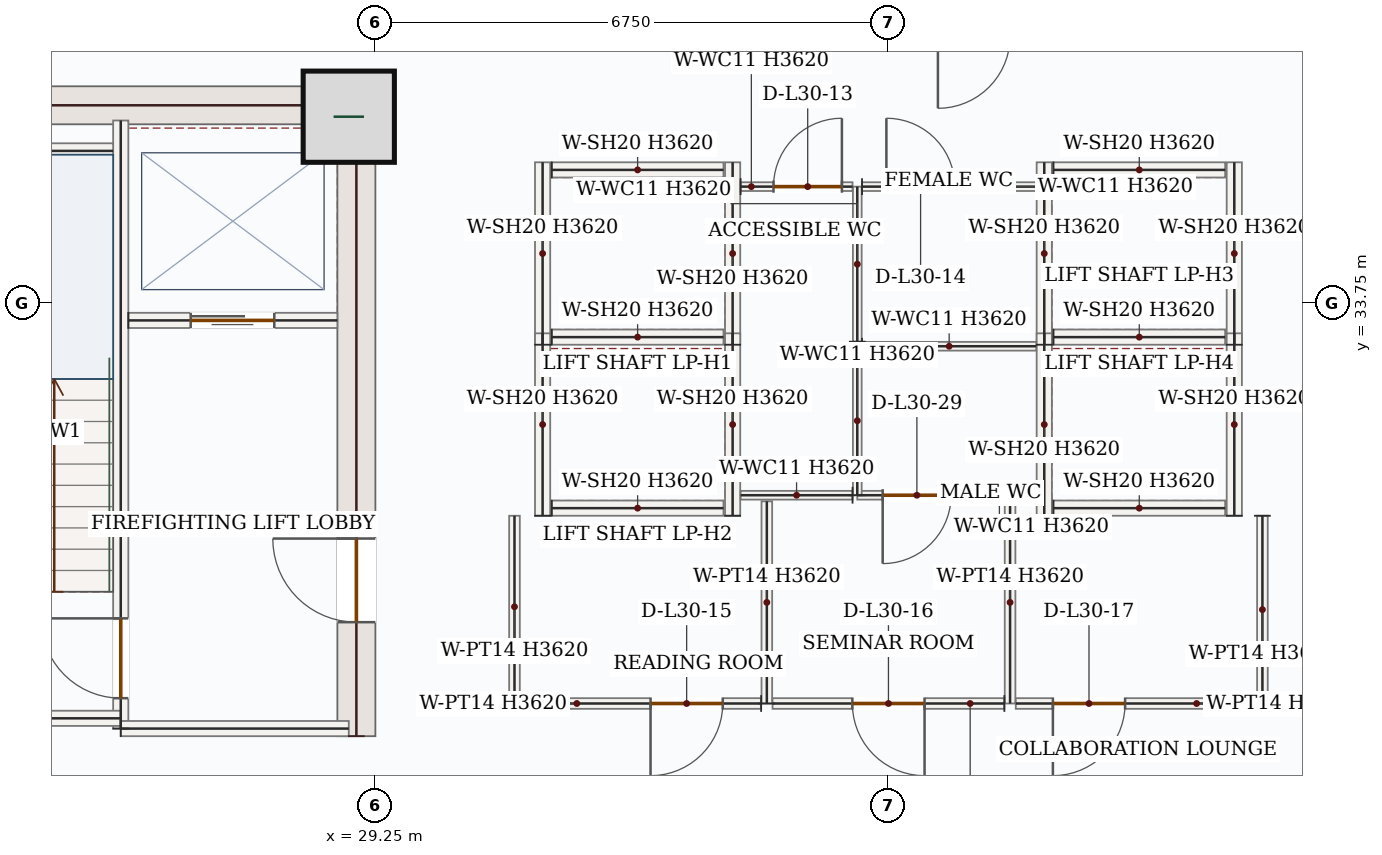
"""IFC4 building model, lengths in metres.
Left out: names, types, materials, properties, quantities, classifications, styles, units other than length and angle.
Written with IfcOpenShell. Run it as: python <this file> out.ifc"""

import sys

from ifc_helpers import new_model, si_unit, direction, frame, frame_2d, origin, origin_2d, place, context, subcontext, project, spatial, rectangle, extrude, source, transform, mapped, element, fill, save


model = new_model("IFC4")
c1 = context("Model", 3, precision=1e-05, world=origin(), true_north=direction((0.0, 1.0)))
c2 = subcontext(c1, "Body", "Model", "MODEL_VIEW")
j1 = project(units=[si_unit("LENGTHUNIT", "METRE"), si_unit("PLANEANGLEUNIT", "RADIAN")], contexts=[c1])
p1 = place(None, origin())
s1 = spatial("IfcSite", under=j1, at=p1, CompositionType="ELEMENT")
p2 = place(p1, origin())
s2 = spatial("IfcBuilding", under=s1, at=p2, CompositionType="ELEMENT")
p3 = place(p2, frame((0.0, 0.0, 135.6)))
s3 = spatial("IfcBuildingStorey", under=s2, at=p3, CompositionType="ELEMENT", Elevation=135.6)
p4 = place(p3, frame((29.0, 28.05, 0.0), z_axis=(0.0, 0.0, 1.0), x_axis=(0.0, 1.0, 0.0)))
e1 = element("IfcWall", 1, at=p4, inside=s3, PredefinedType="SHEAR", context=c2, shape_type="SweptSolid", body=[
    extrude(rectangle(XDim=8.55, YDim=0.5, at=frame_2d((4.275, 0.0))), origin(), (0.0, 0.0, 1.0), 3.62),
])
p5 = place(p4, frame((1.5, 0.0, 0.0)))
e2 = element("IfcOpeningElement", 2, at=p5, cuts=e1, PredefinedType="OPENING", context=c2, shape_type="SweptSolid", body=[
    extrude(rectangle(XDim=1.1, YDim=2.2, at=frame_2d((0.55, 1.1))), frame((0.0, 0.26, 0.0), z_axis=(0.0, -1.0, 0.0), x_axis=(1.0, 0.0, 0.0)), (0.0, 0.0, 1.0), 0.52),
])
m1 = source(origin(), c2, "Body", "SweptSolid", [
    extrude(rectangle(XDim=7.0, YDim=0.5, at=frame_2d((3.5, 0.0))), origin(), (0.0, 0.0, 1.0), 3.62),
])
p6 = place(p3, frame((21.75, 36.35, 0.0), z_axis=(0.0, 0.0, 1.0), x_axis=(1.0, 0.0, 0.0)))
e3 = element("IfcWall", 3, at=p6, inside=s3, PredefinedType="SHEAR", context=c2, shape_type="MappedRepresentation", body=[
    mapped(m1, transform((0.0, 0.0, 0.0), x_axis=(1.0, 0.0, 0.0), y_axis=(0.0, 1.0, 0.0), z_axis=(0.0, 0.0, 1.0), scale=1.0)),
])
m2 = source(origin(), c2, "Body", "SweptSolid", [
    extrude(rectangle(XDim=1.2, YDim=1.2, at=origin_2d()), origin(), (0.0, 0.0, 1.0), 3.9),
])
p7 = place(p3, frame((28.9, 36.2, 0.0), z_axis=(0.0, 0.0, 1.0), x_axis=(1.0, 0.0, 0.0)))
e4 = element("IfcColumn", 4, at=p7, inside=s3, PredefinedType="COLUMN", context=c2, shape_type="MappedRepresentation", body=[
    mapped(m2, transform((0.0, 0.0, 0.0), x_axis=(1.0, 0.0, 0.0), y_axis=(0.0, 1.0, 0.0), z_axis=(0.0, 0.0, 1.0), scale=1.0)),
])
p8 = place(p3, frame((25.9, 28.15, 0.0), z_axis=(0.0, 0.0, 1.0), x_axis=(0.0, 1.0, 0.0)))
e5 = element("IfcWall", 5, at=p8, inside=s3, PredefinedType="SOLIDWALL", context=c2, shape_type="SweptSolid", body=[
    extrude(rectangle(XDim=8.0, YDim=0.2, at=frame_2d((4.0, 0.0))), origin(), (0.0, 0.0, 1.0), 3.62),
])
p9 = place(p8, frame((0.4, 0.0, 0.0)))
e6 = element("IfcOpeningElement", 6, at=p9, cuts=e5, PredefinedType="OPENING", context=c2, shape_type="SweptSolid", body=[
    extrude(rectangle(XDim=1.05, YDim=2.15, at=frame_2d((0.525, 1.075))), frame((0.0, 0.11, 0.0), z_axis=(0.0, -1.0, 0.0), x_axis=(1.0, 0.0, 0.0)), (0.0, 0.0, 1.0), 0.22),
])
m3 = source(origin(), c2, "Body", "SweptSolid", [
    extrude(rectangle(XDim=4.25, YDim=0.2, at=frame_2d((2.125, 0.0))), origin(), (0.0, 0.0, 1.0), 3.62),
])
p10 = place(p3, frame((21.65, 28.285, 0.0), z_axis=(0.0, 0.0, 1.0), x_axis=(1.0, 0.0, 0.0)))
e7 = element("IfcWall", 7, at=p10, inside=s3, PredefinedType="SOLIDWALL", context=c2, shape_type="MappedRepresentation", body=[
    mapped(m3, transform((0.0, 0.0, 0.0), x_axis=(1.0, 0.0, 0.0), y_axis=(0.0, 1.0, 0.0), z_axis=(0.0, 0.0, 1.0), scale=1.0)),
])
m4 = source(origin(), c2, "Body", "SweptSolid", [
    extrude(rectangle(XDim=3.0, YDim=0.2, at=frame_2d((1.5, 0.0))), origin(), (0.0, 0.0, 1.0), 3.62),
])
p11 = place(p3, frame((25.9, 28.15, 0.0), z_axis=(0.0, 0.0, 1.0), x_axis=(1.0, 0.0, 0.0)))
e8 = element("IfcWall", 8, at=p11, inside=s3, PredefinedType="SOLIDWALL", context=c2, shape_type="MappedRepresentation", body=[
    mapped(m4, transform((0.0, 0.0, 0.0), x_axis=(1.0, 0.0, 0.0), y_axis=(0.0, 1.0, 0.0), z_axis=(0.0, 0.0, 1.0), scale=1.0)),
])
m5 = source(origin(), c2, "Body", "SweptSolid", [
    extrude(rectangle(XDim=3.25, YDim=0.2, at=frame_2d((1.625, 0.0))), origin(), (0.0, 0.0, 1.0), 3.62),
])
p12 = place(p3, frame((22.55, 35.75, 0.0), z_axis=(0.0, 0.0, 1.0), x_axis=(1.0, 0.0, 0.0)))
e9 = element("IfcWall", 9, at=p12, inside=s3, PredefinedType="SOLIDWALL", context=c2, shape_type="MappedRepresentation", body=[
    mapped(m5, transform((0.0, 0.0, 0.0), x_axis=(1.0, 0.0, 0.0), y_axis=(0.0, 1.0, 0.0), z_axis=(0.0, 0.0, 1.0), scale=1.0)),
])
p13 = place(p3, frame((26.0, 33.52, 0.0), z_axis=(0.0, 0.0, 1.0), x_axis=(1.0, 0.0, 0.0)))
e10 = element("IfcWall", 10, at=p13, inside=s3, PredefinedType="SOLIDWALL", context=c2, shape_type="SweptSolid", body=[
    extrude(rectangle(XDim=2.75, YDim=0.2, at=frame_2d((1.375, 0.0))), origin(), (0.0, 0.0, 1.0), 3.62),
])
p14 = place(p13, frame((0.82, 0.0, 0.0)))
e11 = element("IfcOpeningElement", 11, at=p14, cuts=e10, PredefinedType="OPENING", context=c2, shape_type="SweptSolid", body=[
    extrude(rectangle(XDim=1.1, YDim=2.15, at=frame_2d((0.55, 1.075))), frame((0.0, 0.11, 0.0), z_axis=(0.0, -1.0, 0.0), x_axis=(1.0, 0.0, 0.0)), (0.0, 0.0, 1.0), 0.22),
])
m6 = source(origin(), c2, "Body", "SweptSolid", [
    extrude(rectangle(XDim=2.4, YDim=0.2, at=frame_2d((1.2, 0.0))), origin(), (0.0, 0.0, 1.0), 3.62),
])
for number, where, z_axis, x_axis in (
    (12, (31.45, 33.2, 0.0), (0.0, 0.0, 1.0), (0.0, 1.0, 0.0)),
    (13, (33.95, 33.2, 0.0), (0.0, 0.0, 1.0), (0.0, 1.0, 0.0)),
):
    element("IfcWall", number, at=place(p3, frame(where, z_axis=z_axis, x_axis=x_axis)), inside=s3, PredefinedType="SOLIDWALL", context=c2, shape_type="MappedRepresentation", body=[
        mapped(m6, transform((0.0, 0.0, 0.0), x_axis=(1.0, 0.0, 0.0), y_axis=(0.0, 1.0, 0.0), z_axis=(0.0, 0.0, 1.0), scale=1.0)),
    ])
m7 = source(origin(), c2, "Body", "SweptSolid", [
    extrude(rectangle(XDim=2.26, YDim=0.2, at=frame_2d((1.13, 0.0))), origin(), (0.0, 0.0, 1.0), 3.62),
])
for number, where, z_axis, x_axis in (
    (14, (31.57, 33.3, 0.0), (0.0, 0.0, 1.0), (1.0, 0.0, 0.0)),
    (15, (31.57, 35.5, 0.0), (0.0, 0.0, 1.0), (1.0, 0.0, 0.0)),
):
    element("IfcWall", number, at=place(p3, frame(where, z_axis=z_axis, x_axis=x_axis)), inside=s3, PredefinedType="SOLIDWALL", context=c2, shape_type="MappedRepresentation", body=[
        mapped(m7, transform((0.0, 0.0, 0.0), x_axis=(1.0, 0.0, 0.0), y_axis=(0.0, 1.0, 0.0), z_axis=(0.0, 0.0, 1.0), scale=1.0)),
    ])
for number, where, z_axis, x_axis in (
    (16, (31.45, 30.95, 0.0), (0.0, 0.0, 1.0), (0.0, 1.0, 0.0)),
    (17, (33.95, 30.95, 0.0), (0.0, 0.0, 1.0), (0.0, 1.0, 0.0)),
):
    element("IfcWall", number, at=place(p3, frame(where, z_axis=z_axis, x_axis=x_axis)), inside=s3, PredefinedType="SOLIDWALL", context=c2, shape_type="MappedRepresentation", body=[
        mapped(m6, transform((0.0, 0.0, 0.0), x_axis=(1.0, 0.0, 0.0), y_axis=(0.0, 1.0, 0.0), z_axis=(0.0, 0.0, 1.0), scale=1.0)),
    ])
p15 = place(p3, frame((31.57, 31.05, 0.0), z_axis=(0.0, 0.0, 1.0), x_axis=(1.0, 0.0, 0.0)))
e18 = element("IfcWall", 18, at=p15, inside=s3, PredefinedType="SOLIDWALL", context=c2, shape_type="MappedRepresentation", body=[
    mapped(m7, transform((0.0, 0.0, 0.0), x_axis=(1.0, 0.0, 0.0), y_axis=(0.0, 1.0, 0.0), z_axis=(0.0, 0.0, 1.0), scale=1.0)),
])
for number, where, z_axis, x_axis in (
    (19, (38.05, 33.2, 0.0), (0.0, 0.0, 1.0), (0.0, 1.0, 0.0)),
    (20, (40.55, 33.2, 0.0), (0.0, 0.0, 1.0), (0.0, 1.0, 0.0)),
):
    element("IfcWall", number, at=place(p3, frame(where, z_axis=z_axis, x_axis=x_axis)), inside=s3, PredefinedType="SOLIDWALL", context=c2, shape_type="MappedRepresentation", body=[
        mapped(m6, transform((0.0, 0.0, 0.0), x_axis=(1.0, 0.0, 0.0), y_axis=(0.0, 1.0, 0.0), z_axis=(0.0, 0.0, 1.0), scale=1.0)),
    ])
for number, where, z_axis, x_axis in (
    (21, (38.17, 33.3, 0.0), (0.0, 0.0, 1.0), (1.0, 0.0, 0.0)),
    (22, (38.17, 35.5, 0.0), (0.0, 0.0, 1.0), (1.0, 0.0, 0.0)),
):
    element("IfcWall", number, at=place(p3, frame(where, z_axis=z_axis, x_axis=x_axis)), inside=s3, PredefinedType="SOLIDWALL", context=c2, shape_type="MappedRepresentation", body=[
        mapped(m7, transform((0.0, 0.0, 0.0), x_axis=(1.0, 0.0, 0.0), y_axis=(0.0, 1.0, 0.0), z_axis=(0.0, 0.0, 1.0), scale=1.0)),
    ])
for number, where, z_axis, x_axis in (
    (23, (38.05, 30.95, 0.0), (0.0, 0.0, 1.0), (0.0, 1.0, 0.0)),
    (24, (40.55, 30.95, 0.0), (0.0, 0.0, 1.0), (0.0, 1.0, 0.0)),
):
    element("IfcWall", number, at=place(p3, frame(where, z_axis=z_axis, x_axis=x_axis)), inside=s3, PredefinedType="SOLIDWALL", context=c2, shape_type="MappedRepresentation", body=[
        mapped(m6, transform((0.0, 0.0, 0.0), x_axis=(1.0, 0.0, 0.0), y_axis=(0.0, 1.0, 0.0), z_axis=(0.0, 0.0, 1.0), scale=1.0)),
    ])
p16 = place(p3, frame((38.17, 31.05, 0.0), z_axis=(0.0, 0.0, 1.0), x_axis=(1.0, 0.0, 0.0)))
e25 = element("IfcWall", 25, at=p16, inside=s3, PredefinedType="SOLIDWALL", context=c2, shape_type="MappedRepresentation", body=[
    mapped(m7, transform((0.0, 0.0, 0.0), x_axis=(1.0, 0.0, 0.0), y_axis=(0.0, 1.0, 0.0), z_axis=(0.0, 0.0, 1.0), scale=1.0)),
])
p17 = place(p3, frame((37.945, 31.22, 0.0), z_axis=(0.0, 0.0, 1.0), x_axis=(-1.0, 0.0, 0.0)))
e26 = element("IfcWall", 26, at=p17, inside=s3, PredefinedType="PARTITIONING", context=c2, shape_type="SweptSolid", body=[
    extrude(rectangle(XDim=2.355, YDim=0.115, at=frame_2d((1.177, 0.0))), origin(), (0.0, 0.0, 1.0), 3.62),
])
p18 = place(p17, frame((1.121, 0.0, 0.0)))
e27 = element("IfcOpeningElement", 27, at=p18, cuts=e26, PredefinedType="OPENING", context=c2, shape_type="SweptSolid", body=[
    extrude(rectangle(XDim=0.9, YDim=2.1, at=frame_2d((0.45, 1.05))), frame((0.0, 0.067, 0.0), z_axis=(0.0, -1.0, 0.0), x_axis=(1.0, 0.0, 0.0)), (0.0, 0.0, 1.0), 0.135),
])
m8 = source(origin(), c2, "Body", "SweptSolid", [
    extrude(rectangle(XDim=1.96, YDim=0.115, at=frame_2d((0.98, 0.0))), origin(), (0.0, 0.0, 1.0), 3.62),
])
p19 = place(p3, frame((35.59, 31.22, 0.0), z_axis=(0.0, 0.0, 1.0), x_axis=(0.0, 1.0, 0.0)))
e28 = element("IfcWall", 28, at=p19, inside=s3, PredefinedType="PARTITIONING", context=c2, shape_type="MappedRepresentation", body=[
    mapped(m8, transform((0.0, 0.0, 0.0), x_axis=(1.0, 0.0, 0.0), y_axis=(0.0, 1.0, 0.0), z_axis=(0.0, 0.0, 1.0), scale=1.0)),
])
m9 = source(origin(), c2, "Body", "SweptSolid", [
    extrude(rectangle(XDim=2.292, YDim=0.115, at=frame_2d((1.146, 0.0))), origin(), (0.0, 0.0, 1.0), 3.62),
])
p20 = place(p3, frame((35.653, 33.18, 0.0), z_axis=(0.0, 0.0, 1.0), x_axis=(1.0, 0.0, 0.0)))
e29 = element("IfcWall", 29, at=p20, inside=s3, PredefinedType="PARTITIONING", context=c2, shape_type="MappedRepresentation", body=[
    mapped(m9, transform((0.0, 0.0, 0.0), x_axis=(1.0, 0.0, 0.0), y_axis=(0.0, 1.0, 0.0), z_axis=(0.0, 0.0, 1.0), scale=1.0)),
])
m10 = source(origin(), c2, "Body", "SweptSolid", [
    extrude(rectangle(XDim=2.04, YDim=0.115, at=frame_2d((1.02, 0.0))), origin(), (0.0, 0.0, 1.0), 3.62),
])
p21 = place(p3, frame((35.59, 33.24, 0.0), z_axis=(0.0, 0.0, 1.0), x_axis=(0.0, 1.0, 0.0)))
e30 = element("IfcWall", 30, at=p21, inside=s3, PredefinedType="PARTITIONING", context=c2, shape_type="MappedRepresentation", body=[
    mapped(m10, transform((0.0, 0.0, 0.0), x_axis=(1.0, 0.0, 0.0), y_axis=(0.0, 1.0, 0.0), z_axis=(0.0, 0.0, 1.0), scale=1.0)),
])
p22 = place(p3, frame((35.653, 35.28, 0.0), z_axis=(0.0, 0.0, 1.0), x_axis=(1.0, 0.0, 0.0)))
e31 = element("IfcWall", 31, at=p22, inside=s3, PredefinedType="PARTITIONING", context=c2, shape_type="SweptSolid", body=[
    extrude(rectangle(XDim=2.292, YDim=0.115, at=frame_2d((1.146, 0.0))), origin(), (0.0, 0.0, 1.0), 3.62),
])
p23 = place(p22, frame((0.32, 0.0, 0.0)))
e32 = element("IfcOpeningElement", 32, at=p23, cuts=e31, PredefinedType="OPENING", context=c2, shape_type="SweptSolid", body=[
    extrude(rectangle(XDim=0.9, YDim=2.1, at=frame_2d((0.45, 1.05))), frame((0.0, 0.067, 0.0), z_axis=(0.0, -1.0, 0.0), x_axis=(1.0, 0.0, 0.0)), (0.0, 0.0, 1.0), 0.135),
])
m11 = source(origin(), c2, "Body", "SweptSolid", [
    extrude(rectangle(XDim=1.473, YDim=0.115, at=frame_2d((0.736, 0.0))), origin(), (0.0, 0.0, 1.0), 3.62),
])
p24 = place(p3, frame((35.528, 31.22, 0.0), z_axis=(0.0, 0.0, 1.0), x_axis=(-1.0, 0.0, 0.0)))
e33 = element("IfcWall", 33, at=p24, inside=s3, PredefinedType="PARTITIONING", context=c2, shape_type="MappedRepresentation", body=[
    mapped(m11, transform((0.0, 0.0, 0.0), x_axis=(1.0, 0.0, 0.0), y_axis=(0.0, 1.0, 0.0), z_axis=(0.0, 0.0, 1.0), scale=1.0)),
])
p25 = place(p3, frame((34.055, 35.28, 0.0), z_axis=(0.0, 0.0, 1.0), x_axis=(1.0, 0.0, 0.0)))
e34 = element("IfcWall", 34, at=p25, inside=s3, PredefinedType="PARTITIONING", context=c2, shape_type="SweptSolid", body=[
    extrude(rectangle(XDim=1.473, YDim=0.115, at=frame_2d((0.736, 0.0))), origin(), (0.0, 0.0, 1.0), 3.62),
])
p26 = place(p25, frame((0.433, 0.0, 0.0)))
e35 = element("IfcOpeningElement", 35, at=p26, cuts=e34, PredefinedType="OPENING", context=c2, shape_type="SweptSolid", body=[
    extrude(rectangle(XDim=0.9, YDim=2.1, at=frame_2d((0.45, 1.05))), frame((0.0, 0.067, 0.0), z_axis=(0.0, -1.0, 0.0), x_axis=(1.0, 0.0, 0.0)), (0.0, 0.0, 1.0), 0.135),
])
m12 = source(origin(), c2, "Body", "SweptSolid", [
    extrude(rectangle(XDim=2.66, YDim=0.14, at=frame_2d((1.33, 0.0))), origin(), (0.0, 0.0, 1.0), 3.62),
])
for number, where, z_axis, x_axis in (
    (36, (34.4, 28.48, 0.0), (0.0, 0.0, 1.0), (0.0, 1.0, 0.0)),
    (37, (37.6, 31.14, 0.0), (0.0, 0.0, 1.0), (0.0, -1.0, 0.0)),
):
    element("IfcWall", number, at=place(p3, frame(where, z_axis=z_axis, x_axis=x_axis)), inside=s3, PredefinedType="PARTITIONING", context=c2, shape_type="MappedRepresentation", body=[
        mapped(m12, transform((0.0, 0.0, 0.0), x_axis=(1.0, 0.0, 0.0), y_axis=(0.0, 1.0, 0.0), z_axis=(0.0, 0.0, 1.0), scale=1.0)),
    ])
p27 = place(p3, frame((37.525, 28.48, 0.0), z_axis=(0.0, 0.0, 1.0), x_axis=(-1.0, 0.0, 0.0)))
e38 = element("IfcWall", 38, at=p27, inside=s3, PredefinedType="PARTITIONING", context=c2, shape_type="SweptSolid", body=[
    extrude(rectangle(XDim=3.05, YDim=0.14, at=frame_2d((1.525, 0.0))), origin(), (0.0, 0.0, 1.0), 3.62),
])
p28 = place(p27, frame((1.05, 0.0, 0.0)))
e39 = element("IfcOpeningElement", 39, at=p28, cuts=e38, PredefinedType="OPENING", context=c2, shape_type="SweptSolid", body=[
    extrude(rectangle(XDim=0.95, YDim=2.15, at=frame_2d((0.475, 1.075))), frame((0.0, 0.08, 0.0), z_axis=(0.0, -1.0, 0.0), x_axis=(1.0, 0.0, 0.0)), (0.0, 0.0, 1.0), 0.16),
])
p29 = place(p3, frame((34.325, 28.48, 0.0), z_axis=(0.0, 0.0, 1.0), x_axis=(-1.0, 0.0, 0.0)))
e40 = element("IfcWall", 40, at=p29, inside=s3, PredefinedType="PARTITIONING", context=c2, shape_type="SweptSolid", body=[
    extrude(rectangle(XDim=3.245, YDim=0.14, at=frame_2d((1.623, 0.0))), origin(), (0.0, 0.0, 1.0), 3.62),
])
p30 = place(p29, frame((0.505, 0.0, 0.0)))
e41 = element("IfcOpeningElement", 41, at=p30, cuts=e40, PredefinedType="OPENING", context=c2, shape_type="SweptSolid", body=[
    extrude(rectangle(XDim=0.95, YDim=2.15, at=frame_2d((0.475, 1.075))), frame((0.0, 0.08, 0.0), z_axis=(0.0, -1.0, 0.0), x_axis=(1.0, 0.0, 0.0)), (0.0, 0.0, 1.0), 0.16),
])
m13 = source(origin(), c2, "Body", "SweptSolid", [
    extrude(rectangle(XDim=2.395, YDim=0.14, at=frame_2d((1.198, 0.0))), origin(), (0.0, 0.0, 1.0), 3.62),
])
p31 = place(p3, frame((31.08, 28.555, 0.0), z_axis=(0.0, 0.0, 1.0), x_axis=(0.0, 1.0, 0.0)))
e42 = element("IfcWall", 42, at=p31, inside=s3, PredefinedType="PARTITIONING", context=c2, shape_type="MappedRepresentation", body=[
    mapped(m13, transform((0.0, 0.0, 0.0), x_axis=(1.0, 0.0, 0.0), y_axis=(0.0, 1.0, 0.0), z_axis=(0.0, 0.0, 1.0), scale=1.0)),
])
m14 = source(origin(), c2, "Body", "SweptSolid", [
    extrude(rectangle(XDim=2.47, YDim=0.14, at=frame_2d((1.235, 0.0))), origin(), (0.0, 0.0, 1.0), 3.62),
])
p32 = place(p3, frame((40.92, 30.95, 0.0), z_axis=(0.0, 0.0, 1.0), x_axis=(0.0, -1.0, 0.0)))
e43 = element("IfcWall", 43, at=p32, inside=s3, PredefinedType="PARTITIONING", context=c2, shape_type="MappedRepresentation", body=[
    mapped(m14, transform((0.0, 0.0, 0.0), x_axis=(1.0, 0.0, 0.0), y_axis=(0.0, 1.0, 0.0), z_axis=(0.0, 0.0, 1.0), scale=1.0)),
])
p33 = place(p3, frame((40.845, 28.48, 0.0), z_axis=(0.0, 0.0, 1.0), x_axis=(-1.0, 0.0, 0.0)))
e44 = element("IfcWall", 44, at=p33, inside=s3, PredefinedType="PARTITIONING", context=c2, shape_type="SweptSolid", body=[
    extrude(rectangle(XDim=3.17, YDim=0.14, at=frame_2d((1.585, 0.0))), origin(), (0.0, 0.0, 1.0), 3.62),
])
p34 = place(p33, frame((1.732, 0.0, 0.0)))
e45 = element("IfcOpeningElement", 45, at=p34, cuts=e44, PredefinedType="OPENING", context=c2, shape_type="SweptSolid", body=[
    extrude(rectangle(XDim=0.95, YDim=2.15, at=frame_2d((0.475, 1.075))), frame((0.0, 0.08, 0.0), z_axis=(0.0, -1.0, 0.0), x_axis=(1.0, 0.0, 0.0)), (0.0, 0.0, 1.0), 0.16),
])
m15 = source(origin(), c2, "Body", "SweptSolid", [
    extrude(rectangle(XDim=1.05, YDim=2.15, at=frame_2d((0.525, 1.075))), frame((0.0, 0.025, 0.0), z_axis=(0.0, -1.0, 0.0), x_axis=(1.0, 0.0, 0.0)), (0.0, 0.0, 1.0), 0.05),
])
p35 = place(p9, origin())
e46 = element("IfcDoor", 46, at=p35, inside=s3, OperationType="SINGLE_SWING_RIGHT", PredefinedType="DOOR", context=c2, shape_type="MappedRepresentation", body=[
    mapped(m15, transform((0.0, 0.0, 0.0), x_axis=(1.0, 0.0, 0.0), y_axis=(0.0, 1.0, 0.0), z_axis=(0.0, 0.0, 1.0), scale=1.0)),
])
fill(e6, e46)
m16 = source(origin(), c2, "Body", "SweptSolid", [
    extrude(rectangle(XDim=1.1, YDim=2.15, at=frame_2d((0.55, 1.075))), frame((0.0, 0.025, 0.0), z_axis=(0.0, -1.0, 0.0), x_axis=(1.0, 0.0, 0.0)), (0.0, 0.0, 1.0), 0.05),
])
p36 = place(p14, origin())
e47 = element("IfcDoor", 47, at=p36, inside=s3, OperationType="DOUBLE_DOOR_SLIDING", PredefinedType="DOOR", context=c2, shape_type="MappedRepresentation", body=[
    mapped(m16, transform((0.0, 0.0, 0.0), x_axis=(1.0, 0.0, 0.0), y_axis=(0.0, 1.0, 0.0), z_axis=(0.0, 0.0, 1.0), scale=1.0)),
])
fill(e11, e47)
m17 = source(origin(), c2, "Body", "SweptSolid", [
    extrude(rectangle(XDim=1.1, YDim=2.2, at=frame_2d((0.55, 1.1))), frame((0.0, 0.025, 0.0), z_axis=(0.0, -1.0, 0.0), x_axis=(1.0, 0.0, 0.0)), (0.0, 0.0, 1.0), 0.05),
])
p37 = place(p5, origin())
e48 = element("IfcDoor", 48, at=p37, inside=s3, OperationType="SINGLE_SWING_RIGHT", PredefinedType="DOOR", context=c2, shape_type="MappedRepresentation", body=[
    mapped(m17, transform((0.0, 0.0, 0.0), x_axis=(1.0, 0.0, 0.0), y_axis=(0.0, 1.0, 0.0), z_axis=(0.0, 0.0, 1.0), scale=1.0)),
])
fill(e2, e48)
m18 = source(origin(), c2, "Body", "SweptSolid", [
    extrude(rectangle(XDim=0.9, YDim=2.1, at=frame_2d((0.45, 1.05))), frame((0.0, 0.025, 0.0), z_axis=(0.0, -1.0, 0.0), x_axis=(1.0, 0.0, 0.0)), (0.0, 0.0, 1.0), 0.05),
])
p38 = place(p26, origin())
e49 = element("IfcDoor", 49, at=p38, inside=s3, OperationType="SINGLE_SWING_RIGHT", PredefinedType="DOOR", context=c2, shape_type="MappedRepresentation", body=[
    mapped(m18, transform((0.0, 0.0, 0.0), x_axis=(1.0, 0.0, 0.0), y_axis=(0.0, 1.0, 0.0), z_axis=(0.0, 0.0, 1.0), scale=1.0)),
])
fill(e35, e49)
p39 = place(p23, origin())
e50 = element("IfcDoor", 50, at=p39, inside=s3, OperationType="SINGLE_SWING_LEFT", PredefinedType="DOOR", context=c2, shape_type="MappedRepresentation", body=[
    mapped(m18, transform((0.0, 0.0, 0.0), x_axis=(1.0, 0.0, 0.0), y_axis=(0.0, 1.0, 0.0), z_axis=(0.0, 0.0, 1.0), scale=1.0)),
])
fill(e32, e50)
m19 = source(origin(), c2, "Body", "SweptSolid", [
    extrude(rectangle(XDim=0.95, YDim=2.15, at=frame_2d((0.475, 1.075))), frame((0.0, 0.025, 0.0), z_axis=(0.0, -1.0, 0.0), x_axis=(1.0, 0.0, 0.0)), (0.0, 0.0, 1.0), 0.05),
])
p40 = place(p30, origin())
e51 = element("IfcDoor", 51, at=p40, inside=s3, OperationType="SINGLE_SWING_RIGHT", PredefinedType="DOOR", context=c2, shape_type="MappedRepresentation", body=[
    mapped(m19, transform((0.0, 0.0, 0.0), x_axis=(1.0, 0.0, 0.0), y_axis=(0.0, 1.0, 0.0), z_axis=(0.0, 0.0, 1.0), scale=1.0)),
])
fill(e41, e51)
p41 = place(p28, origin())
e52 = element("IfcDoor", 52, at=p41, inside=s3, OperationType="SINGLE_SWING_LEFT", PredefinedType="DOOR", context=c2, shape_type="MappedRepresentation", body=[
    mapped(m19, transform((0.0, 0.0, 0.0), x_axis=(1.0, 0.0, 0.0), y_axis=(0.0, 1.0, 0.0), z_axis=(0.0, 0.0, 1.0), scale=1.0)),
])
fill(e39, e52)
p42 = place(p34, origin())
e53 = element("IfcDoor", 53, at=p42, inside=s3, OperationType="SINGLE_SWING_RIGHT", PredefinedType="DOOR", context=c2, shape_type="MappedRepresentation", body=[
    mapped(m19, transform((0.0, 0.0, 0.0), x_axis=(1.0, 0.0, 0.0), y_axis=(0.0, 1.0, 0.0), z_axis=(0.0, 0.0, 1.0), scale=1.0)),
])
fill(e45, e53)
p43 = place(p18, origin())
e54 = element("IfcDoor", 54, at=p43, inside=s3, OperationType="SINGLE_SWING_RIGHT", PredefinedType="DOOR", context=c2, shape_type="MappedRepresentation", body=[
    mapped(m18, transform((0.0, 0.0, 0.0), x_axis=(1.0, 0.0, 0.0), y_axis=(0.0, 1.0, 0.0), z_axis=(0.0, 0.0, 1.0), scale=1.0)),
])
fill(e27, e54)
save(model, sys.argv[1])
